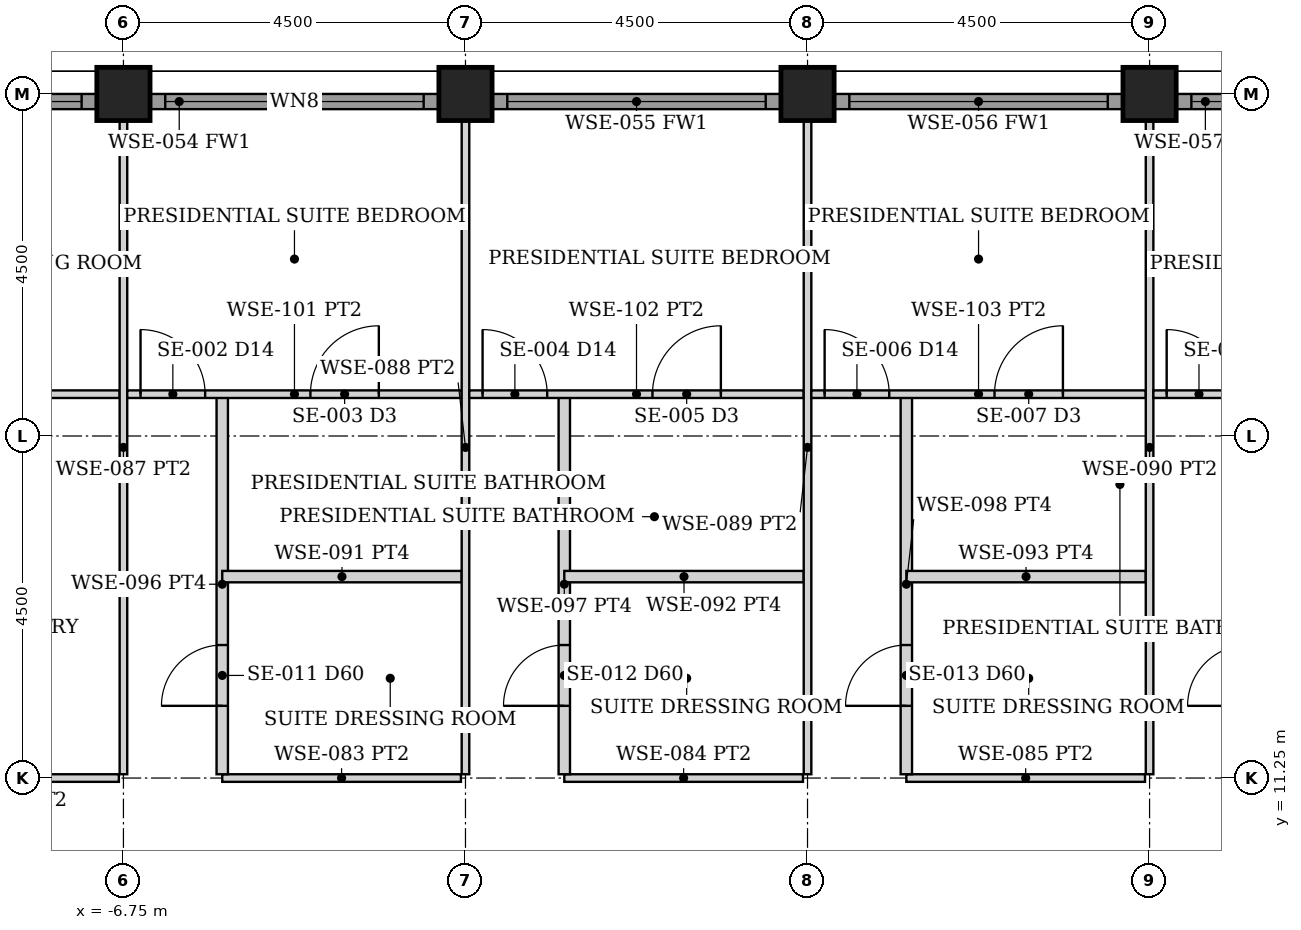
"""IFC4 building model, lengths in metres.
Left out: names, types, materials, properties, quantities, classifications, styles, units other than length and angle.
Written with IfcOpenShell. Run it as: python <this file> out.ifc"""

import sys

from ifc_helpers import new_model, si_unit, direction, frame, frame_2d, origin, origin_2d, place, context, subcontext, project, spatial, rectangle, hollow_rectangle, extrude, element, fill, save


model = new_model("IFC4")
c1 = context("Model", 3, precision=1e-05, world=origin(), true_north=direction((0.0, 1.0)))
c2 = subcontext(c1, "Body", "Model", "MODEL_VIEW")
j1 = project(units=[si_unit("LENGTHUNIT", "METRE"), si_unit("PLANEANGLEUNIT", "RADIAN")], contexts=[c1])
p1 = place(None, origin())
s1 = spatial("IfcSite", under=j1, at=p1, CompositionType="ELEMENT")
p2 = place(p1, origin())
s2 = spatial("IfcBuilding", under=s1, at=p2, CompositionType="ELEMENT")
p3 = place(p2, frame((0.0, 0.0, 253.3)))
s3 = spatial("IfcBuildingStorey", under=s2, at=p3, CompositionType="ELEMENT", Elevation=253.3)
for number, where, z_axis, x_axis in (
    (1, (-6.75, 20.25, 0.0), (0.0, 0.0, 1.0), (0.0, 1.0, 0.0)),
    (2, (-2.25, 20.25, 0.0), (0.0, 0.0, 1.0), (0.0, 1.0, 0.0)),
    (3, (2.25, 20.25, 0.0), (0.0, 0.0, 1.0), (0.0, 1.0, 0.0)),
    (4, (6.75, 20.25, 0.0), (0.0, 0.0, 1.0), (0.0, 1.0, 0.0)),
):
    element("IfcColumn", number, at=place(p3, frame(where, z_axis=z_axis, x_axis=x_axis)), inside=s3, PredefinedType="COLUMN", context=c2, shape_type="SweptSolid", body=[
        extrude(hollow_rectangle(XDim=0.7, YDim=0.7, WallThickness=0.035, at=origin_2d()), origin(), (0.0, 0.0, 1.0), 3.75),
    ])
p4 = place(p3, frame((-10.895, 20.15, 0.0), z_axis=(0.0, 0.0, 1.0), x_axis=(1.0, 0.0, 0.0)))
e5 = element("IfcWall", 5, at=p4, inside=s3, PredefinedType="SOLIDWALL", context=c2, shape_type="SweptSolid", body=[
    extrude(rectangle(XDim=3.79, YDim=0.2, at=frame_2d((1.895, 0.0))), origin(), (0.0, 0.0, 1.0), 2.579),
])
p5 = place(p4, frame((0.195, 0.0, 0.3)))
e6 = element("IfcOpeningElement", 6, at=p5, cuts=e5, PredefinedType="OPENING", context=c2, shape_type="SweptSolid", body=[
    extrude(rectangle(XDim=3.4, YDim=2.129, at=frame_2d((1.7, 1.064))), frame((0.0, 0.11, 0.0), z_axis=(0.0, -1.0, 0.0), x_axis=(1.0, 0.0, 0.0)), (0.0, 0.0, 1.0), 0.22),
])
p6 = place(p3, frame((-6.395, 20.15, 0.0), z_axis=(0.0, 0.0, 1.0), x_axis=(1.0, 0.0, 0.0)))
e7 = element("IfcWall", 7, at=p6, inside=s3, PredefinedType="SOLIDWALL", context=c2, shape_type="SweptSolid", body=[
    extrude(rectangle(XDim=3.79, YDim=0.2, at=frame_2d((1.895, 0.0))), origin(), (0.0, 0.0, 1.0), 2.579),
])
p7 = place(p6, frame((0.195, 0.0, 0.3)))
e8 = element("IfcOpeningElement", 8, at=p7, cuts=e7, PredefinedType="OPENING", context=c2, shape_type="SweptSolid", body=[
    extrude(rectangle(XDim=3.4, YDim=2.129, at=frame_2d((1.7, 1.064))), frame((0.0, 0.11, 0.0), z_axis=(0.0, -1.0, 0.0), x_axis=(1.0, 0.0, 0.0)), (0.0, 0.0, 1.0), 0.22),
])
p8 = place(p3, frame((-1.895, 20.15, 0.0), z_axis=(0.0, 0.0, 1.0), x_axis=(1.0, 0.0, 0.0)))
e9 = element("IfcWall", 9, at=p8, inside=s3, PredefinedType="SOLIDWALL", context=c2, shape_type="SweptSolid", body=[
    extrude(rectangle(XDim=3.79, YDim=0.2, at=frame_2d((1.895, 0.0))), origin(), (0.0, 0.0, 1.0), 2.579),
])
p9 = place(p8, frame((0.195, 0.0, 0.3)))
e10 = element("IfcOpeningElement", 10, at=p9, cuts=e9, PredefinedType="OPENING", context=c2, shape_type="SweptSolid", body=[
    extrude(rectangle(XDim=3.4, YDim=2.129, at=frame_2d((1.7, 1.064))), frame((0.0, 0.11, 0.0), z_axis=(0.0, -1.0, 0.0), x_axis=(1.0, 0.0, 0.0)), (0.0, 0.0, 1.0), 0.22),
])
p10 = place(p3, frame((2.605, 20.15, 0.0), z_axis=(0.0, 0.0, 1.0), x_axis=(1.0, 0.0, 0.0)))
e11 = element("IfcWall", 11, at=p10, inside=s3, PredefinedType="SOLIDWALL", context=c2, shape_type="SweptSolid", body=[
    extrude(rectangle(XDim=3.79, YDim=0.2, at=frame_2d((1.895, 0.0))), origin(), (0.0, 0.0, 1.0), 2.579),
])
p11 = place(p10, frame((0.195, 0.0, 0.3)))
e12 = element("IfcOpeningElement", 12, at=p11, cuts=e11, PredefinedType="OPENING", context=c2, shape_type="SweptSolid", body=[
    extrude(rectangle(XDim=3.4, YDim=2.129, at=frame_2d((1.7, 1.064))), frame((0.0, 0.11, 0.0), z_axis=(0.0, -1.0, 0.0), x_axis=(1.0, 0.0, 0.0)), (0.0, 0.0, 1.0), 0.22),
])
p12 = place(p3, frame((7.105, 20.15, 0.0), z_axis=(0.0, 0.0, 1.0), x_axis=(1.0, 0.0, 0.0)))
e13 = element("IfcWall", 13, at=p12, inside=s3, PredefinedType="SOLIDWALL", context=c2, shape_type="SweptSolid", body=[
    extrude(rectangle(XDim=3.79, YDim=0.2, at=frame_2d((1.895, 0.0))), origin(), (0.0, 0.0, 1.0), 2.579),
])
p13 = place(p12, frame((0.195, 0.0, 0.3)))
e14 = element("IfcOpeningElement", 14, at=p13, cuts=e13, PredefinedType="OPENING", context=c2, shape_type="SweptSolid", body=[
    extrude(rectangle(XDim=3.4, YDim=2.129, at=frame_2d((1.7, 1.064))), frame((0.0, 0.11, 0.0), z_axis=(0.0, -1.0, 0.0), x_axis=(1.0, 0.0, 0.0)), (0.0, 0.0, 1.0), 0.22),
])
p14 = place(p3, frame((-9.95, 11.25, 0.0), z_axis=(0.0, 0.0, 1.0), x_axis=(1.0, 0.0, 0.0)))
e15 = element("IfcWall", 15, at=p14, inside=s3, PredefinedType="PARTITIONING", context=c2, shape_type="SweptSolid", body=[
    extrude(rectangle(XDim=3.14, YDim=0.1, at=frame_2d((1.57, 0.0))), origin(), (0.0, 0.0, 1.0), 2.573),
])
p15 = place(p3, frame((-11.19, 16.3, 0.0), z_axis=(0.0, 0.0, 1.0), x_axis=(1.0, 0.0, 0.0)))
e16 = element("IfcWall", 16, at=p15, inside=s3, PredefinedType="PARTITIONING", context=c2, shape_type="SweptSolid", body=[
    extrude(rectangle(XDim=4.39, YDim=0.1, at=frame_2d((2.195, 0.0))), origin(), (0.0, 0.0, 1.0), 2.573),
])
p16 = place(p15, frame((0.14, 0.0, 0.0)))
e17 = element("IfcOpeningElement", 17, at=p16, cuts=e16, PredefinedType="OPENING", context=c2, shape_type="SweptSolid", body=[
    extrude(rectangle(XDim=0.9, YDim=2.1, at=frame_2d((0.45, 1.05))), frame((0.0, 0.06, 0.0), z_axis=(0.0, -1.0, 0.0), x_axis=(1.0, 0.0, 0.0)), (0.0, 0.0, 1.0), 0.12),
])
p17 = place(p3, frame((-6.75, 11.3, 0.0), z_axis=(0.0, 0.0, 1.0), x_axis=(0.0, 1.0, 0.0)))
e18 = element("IfcWall", 18, at=p17, inside=s3, PredefinedType="PARTITIONING", context=c2, shape_type="SweptSolid", body=[
    extrude(rectangle(XDim=8.6, YDim=0.1, at=frame_2d((4.3, 0.0))), origin(), (0.0, 0.0, 1.0), 2.573),
])
p18 = place(p3, frame((-5.45, 11.25, 0.0), z_axis=(0.0, 0.0, 1.0), x_axis=(1.0, 0.0, 0.0)))
e19 = element("IfcWall", 19, at=p18, inside=s3, PredefinedType="PARTITIONING", context=c2, shape_type="SweptSolid", body=[
    extrude(rectangle(XDim=3.14, YDim=0.1, at=frame_2d((1.57, 0.0))), origin(), (0.0, 0.0, 1.0), 2.573),
])
p19 = place(p3, frame((-5.45, 11.3, 0.0), z_axis=(0.0, 0.0, 1.0), x_axis=(0.0, 1.0, 0.0)))
e20 = element("IfcWall", 20, at=p19, inside=s3, PredefinedType="PARTITIONING", context=c2, shape_type="SweptSolid", body=[
    extrude(rectangle(XDim=5.0, YDim=0.15, at=frame_2d((2.5, 0.0))), origin(), (0.0, 0.0, 1.0), 2.573),
])
p20 = place(p19, frame((0.9, 0.0, 0.0)))
e21 = element("IfcOpeningElement", 21, at=p20, cuts=e20, PredefinedType="OPENING", context=c2, shape_type="SweptSolid", body=[
    extrude(rectangle(XDim=0.8, YDim=2.1, at=frame_2d((0.4, 1.05))), frame((0.0, 0.085, 0.0), z_axis=(0.0, -1.0, 0.0), x_axis=(1.0, 0.0, 0.0)), (0.0, 0.0, 1.0), 0.17),
])
p21 = place(p3, frame((-6.7, 16.3, 0.0), z_axis=(0.0, 0.0, 1.0), x_axis=(1.0, 0.0, 0.0)))
e22 = element("IfcWall", 22, at=p21, inside=s3, PredefinedType="PARTITIONING", context=c2, shape_type="SweptSolid", body=[
    extrude(rectangle(XDim=4.4, YDim=0.1, at=frame_2d((2.2, 0.0))), origin(), (0.0, 0.0, 1.0), 2.573),
])
p22 = place(p21, frame((0.175, 0.0, 0.0)))
e23 = element("IfcOpeningElement", 23, at=p22, cuts=e22, PredefinedType="OPENING", context=c2, shape_type="SweptSolid", body=[
    extrude(rectangle(XDim=0.85, YDim=2.1, at=frame_2d((0.425, 1.05))), frame((0.0, 0.06, 0.0), z_axis=(0.0, -1.0, 0.0), x_axis=(1.0, 0.0, 0.0)), (0.0, 0.0, 1.0), 0.12),
])
p23 = place(p21, frame((2.41, 0.0, 0.0)))
e24 = element("IfcOpeningElement", 24, at=p23, cuts=e22, PredefinedType="OPENING", context=c2, shape_type="SweptSolid", body=[
    extrude(rectangle(XDim=0.9, YDim=2.1, at=frame_2d((0.45, 1.05))), frame((0.0, 0.06, 0.0), z_axis=(0.0, -1.0, 0.0), x_axis=(1.0, 0.0, 0.0)), (0.0, 0.0, 1.0), 0.12),
])
p24 = place(p3, frame((-5.45, 13.9, 0.0), z_axis=(0.0, 0.0, 1.0), x_axis=(1.0, 0.0, 0.0)))
e25 = element("IfcWall", 25, at=p24, inside=s3, PredefinedType="PARTITIONING", context=c2, shape_type="SweptSolid", body=[
    extrude(rectangle(XDim=3.15, YDim=0.15, at=frame_2d((1.575, 0.0))), origin(), (0.0, 0.0, 1.0), 2.573),
])
p25 = place(p3, frame((-2.25, 11.3, 0.0), z_axis=(0.0, 0.0, 1.0), x_axis=(0.0, 1.0, 0.0)))
e26 = element("IfcWall", 26, at=p25, inside=s3, PredefinedType="PARTITIONING", context=c2, shape_type="SweptSolid", body=[
    extrude(rectangle(XDim=8.6, YDim=0.1, at=frame_2d((4.3, 0.0))), origin(), (0.0, 0.0, 1.0), 2.573),
])
p26 = place(p3, frame((-0.95, 11.25, 0.0), z_axis=(0.0, 0.0, 1.0), x_axis=(1.0, 0.0, 0.0)))
e27 = element("IfcWall", 27, at=p26, inside=s3, PredefinedType="PARTITIONING", context=c2, shape_type="SweptSolid", body=[
    extrude(rectangle(XDim=3.14, YDim=0.1, at=frame_2d((1.57, 0.0))), origin(), (0.0, 0.0, 1.0), 2.573),
])
p27 = place(p3, frame((-0.95, 11.3, 0.0), z_axis=(0.0, 0.0, 1.0), x_axis=(0.0, 1.0, 0.0)))
e28 = element("IfcWall", 28, at=p27, inside=s3, PredefinedType="PARTITIONING", context=c2, shape_type="SweptSolid", body=[
    extrude(rectangle(XDim=5.0, YDim=0.15, at=frame_2d((2.5, 0.0))), origin(), (0.0, 0.0, 1.0), 2.573),
])
p28 = place(p27, frame((0.9, 0.0, 0.0)))
e29 = element("IfcOpeningElement", 29, at=p28, cuts=e28, PredefinedType="OPENING", context=c2, shape_type="SweptSolid", body=[
    extrude(rectangle(XDim=0.8, YDim=2.1, at=frame_2d((0.4, 1.05))), frame((0.0, 0.085, 0.0), z_axis=(0.0, -1.0, 0.0), x_axis=(1.0, 0.0, 0.0)), (0.0, 0.0, 1.0), 0.17),
])
p29 = place(p3, frame((-2.2, 16.3, 0.0), z_axis=(0.0, 0.0, 1.0), x_axis=(1.0, 0.0, 0.0)))
e30 = element("IfcWall", 30, at=p29, inside=s3, PredefinedType="PARTITIONING", context=c2, shape_type="SweptSolid", body=[
    extrude(rectangle(XDim=4.4, YDim=0.1, at=frame_2d((2.2, 0.0))), origin(), (0.0, 0.0, 1.0), 2.573),
])
p30 = place(p29, frame((0.175, 0.0, 0.0)))
e31 = element("IfcOpeningElement", 31, at=p30, cuts=e30, PredefinedType="OPENING", context=c2, shape_type="SweptSolid", body=[
    extrude(rectangle(XDim=0.85, YDim=2.1, at=frame_2d((0.425, 1.05))), frame((0.0, 0.06, 0.0), z_axis=(0.0, -1.0, 0.0), x_axis=(1.0, 0.0, 0.0)), (0.0, 0.0, 1.0), 0.12),
])
p31 = place(p29, frame((2.41, 0.0, 0.0)))
e32 = element("IfcOpeningElement", 32, at=p31, cuts=e30, PredefinedType="OPENING", context=c2, shape_type="SweptSolid", body=[
    extrude(rectangle(XDim=0.9, YDim=2.1, at=frame_2d((0.45, 1.05))), frame((0.0, 0.06, 0.0), z_axis=(0.0, -1.0, 0.0), x_axis=(1.0, 0.0, 0.0)), (0.0, 0.0, 1.0), 0.12),
])
p32 = place(p3, frame((-0.95, 13.9, 0.0), z_axis=(0.0, 0.0, 1.0), x_axis=(1.0, 0.0, 0.0)))
e33 = element("IfcWall", 33, at=p32, inside=s3, PredefinedType="PARTITIONING", context=c2, shape_type="SweptSolid", body=[
    extrude(rectangle(XDim=3.15, YDim=0.15, at=frame_2d((1.575, 0.0))), origin(), (0.0, 0.0, 1.0), 2.573),
])
p33 = place(p3, frame((2.25, 11.3, 0.0), z_axis=(0.0, 0.0, 1.0), x_axis=(0.0, 1.0, 0.0)))
e34 = element("IfcWall", 34, at=p33, inside=s3, PredefinedType="PARTITIONING", context=c2, shape_type="SweptSolid", body=[
    extrude(rectangle(XDim=8.6, YDim=0.1, at=frame_2d((4.3, 0.0))), origin(), (0.0, 0.0, 1.0), 2.573),
])
p34 = place(p3, frame((3.55, 11.25, 0.0), z_axis=(0.0, 0.0, 1.0), x_axis=(1.0, 0.0, 0.0)))
e35 = element("IfcWall", 35, at=p34, inside=s3, PredefinedType="PARTITIONING", context=c2, shape_type="SweptSolid", body=[
    extrude(rectangle(XDim=3.14, YDim=0.1, at=frame_2d((1.57, 0.0))), origin(), (0.0, 0.0, 1.0), 2.573),
])
p35 = place(p3, frame((3.55, 11.3, 0.0), z_axis=(0.0, 0.0, 1.0), x_axis=(0.0, 1.0, 0.0)))
e36 = element("IfcWall", 36, at=p35, inside=s3, PredefinedType="PARTITIONING", context=c2, shape_type="SweptSolid", body=[
    extrude(rectangle(XDim=5.0, YDim=0.15, at=frame_2d((2.5, 0.0))), origin(), (0.0, 0.0, 1.0), 2.573),
])
p36 = place(p35, frame((0.9, 0.0, 0.0)))
e37 = element("IfcOpeningElement", 37, at=p36, cuts=e36, PredefinedType="OPENING", context=c2, shape_type="SweptSolid", body=[
    extrude(rectangle(XDim=0.8, YDim=2.1, at=frame_2d((0.4, 1.05))), frame((0.0, 0.085, 0.0), z_axis=(0.0, -1.0, 0.0), x_axis=(1.0, 0.0, 0.0)), (0.0, 0.0, 1.0), 0.17),
])
p37 = place(p3, frame((2.3, 16.3, 0.0), z_axis=(0.0, 0.0, 1.0), x_axis=(1.0, 0.0, 0.0)))
e38 = element("IfcWall", 38, at=p37, inside=s3, PredefinedType="PARTITIONING", context=c2, shape_type="SweptSolid", body=[
    extrude(rectangle(XDim=4.4, YDim=0.1, at=frame_2d((2.2, 0.0))), origin(), (0.0, 0.0, 1.0), 2.573),
])
p38 = place(p37, frame((0.175, 0.0, 0.0)))
e39 = element("IfcOpeningElement", 39, at=p38, cuts=e38, PredefinedType="OPENING", context=c2, shape_type="SweptSolid", body=[
    extrude(rectangle(XDim=0.85, YDim=2.1, at=frame_2d((0.425, 1.05))), frame((0.0, 0.06, 0.0), z_axis=(0.0, -1.0, 0.0), x_axis=(1.0, 0.0, 0.0)), (0.0, 0.0, 1.0), 0.12),
])
p39 = place(p37, frame((2.41, 0.0, 0.0)))
e40 = element("IfcOpeningElement", 40, at=p39, cuts=e38, PredefinedType="OPENING", context=c2, shape_type="SweptSolid", body=[
    extrude(rectangle(XDim=0.9, YDim=2.1, at=frame_2d((0.45, 1.05))), frame((0.0, 0.06, 0.0), z_axis=(0.0, -1.0, 0.0), x_axis=(1.0, 0.0, 0.0)), (0.0, 0.0, 1.0), 0.12),
])
p40 = place(p3, frame((3.55, 13.9, 0.0), z_axis=(0.0, 0.0, 1.0), x_axis=(1.0, 0.0, 0.0)))
e41 = element("IfcWall", 41, at=p40, inside=s3, PredefinedType="PARTITIONING", context=c2, shape_type="SweptSolid", body=[
    extrude(rectangle(XDim=3.15, YDim=0.15, at=frame_2d((1.575, 0.0))), origin(), (0.0, 0.0, 1.0), 2.573),
])
p41 = place(p3, frame((6.75, 11.3, 0.0), z_axis=(0.0, 0.0, 1.0), x_axis=(0.0, 1.0, 0.0)))
e42 = element("IfcWall", 42, at=p41, inside=s3, PredefinedType="PARTITIONING", context=c2, shape_type="SweptSolid", body=[
    extrude(rectangle(XDim=8.6, YDim=0.1, at=frame_2d((4.3, 0.0))), origin(), (0.0, 0.0, 1.0), 2.573),
])
p42 = place(p3, frame((6.8, 16.3, 0.0), z_axis=(0.0, 0.0, 1.0), x_axis=(1.0, 0.0, 0.0)))
e43 = element("IfcWall", 43, at=p42, inside=s3, PredefinedType="PARTITIONING", context=c2, shape_type="SweptSolid", body=[
    extrude(rectangle(XDim=4.39, YDim=0.1, at=frame_2d((2.195, 0.0))), origin(), (0.0, 0.0, 1.0), 2.573),
])
p43 = place(p42, frame((0.175, 0.0, 0.0)))
e44 = element("IfcOpeningElement", 44, at=p43, cuts=e43, PredefinedType="OPENING", context=c2, shape_type="SweptSolid", body=[
    extrude(rectangle(XDim=0.85, YDim=2.1, at=frame_2d((0.425, 1.05))), frame((0.0, 0.06, 0.0), z_axis=(0.0, -1.0, 0.0), x_axis=(1.0, 0.0, 0.0)), (0.0, 0.0, 1.0), 0.12),
])
p44 = place(p42, frame((2.41, 0.0, 0.0)))
e45 = element("IfcOpeningElement", 45, at=p44, cuts=e43, PredefinedType="OPENING", context=c2, shape_type="SweptSolid", body=[
    extrude(rectangle(XDim=0.9, YDim=2.1, at=frame_2d((0.45, 1.05))), frame((0.0, 0.06, 0.0), z_axis=(0.0, -1.0, 0.0), x_axis=(1.0, 0.0, 0.0)), (0.0, 0.0, 1.0), 0.12),
])
p45 = place(p5, origin())
e46 = element("IfcWindow", 46, at=p45, inside=s3, PartitioningType="SINGLE_PANEL", PredefinedType="WINDOW", context=c2, shape_type="SweptSolid", body=[
    extrude(rectangle(XDim=3.4, YDim=2.129, at=frame_2d((1.7, 1.064))), frame((0.0, 0.03, 0.0), z_axis=(0.0, -1.0, 0.0), x_axis=(1.0, 0.0, 0.0)), (0.0, 0.0, 1.0), 0.06),
])
fill(e6, e46)
p46 = place(p7, origin())
e47 = element("IfcWindow", 47, at=p46, inside=s3, PartitioningType="SINGLE_PANEL", PredefinedType="WINDOW", context=c2, shape_type="SweptSolid", body=[
    extrude(rectangle(XDim=3.4, YDim=2.129, at=frame_2d((1.7, 1.064))), frame((0.0, 0.03, 0.0), z_axis=(0.0, -1.0, 0.0), x_axis=(1.0, 0.0, 0.0)), (0.0, 0.0, 1.0), 0.06),
])
fill(e8, e47)
p47 = place(p9, origin())
e48 = element("IfcWindow", 48, at=p47, inside=s3, PartitioningType="SINGLE_PANEL", PredefinedType="WINDOW", context=c2, shape_type="SweptSolid", body=[
    extrude(rectangle(XDim=3.4, YDim=2.129, at=frame_2d((1.7, 1.064))), frame((0.0, 0.03, 0.0), z_axis=(0.0, -1.0, 0.0), x_axis=(1.0, 0.0, 0.0)), (0.0, 0.0, 1.0), 0.06),
])
fill(e10, e48)
p48 = place(p11, origin())
e49 = element("IfcWindow", 49, at=p48, inside=s3, PartitioningType="SINGLE_PANEL", PredefinedType="WINDOW", context=c2, shape_type="SweptSolid", body=[
    extrude(rectangle(XDim=3.4, YDim=2.129, at=frame_2d((1.7, 1.064))), frame((0.0, 0.03, 0.0), z_axis=(0.0, -1.0, 0.0), x_axis=(1.0, 0.0, 0.0)), (0.0, 0.0, 1.0), 0.06),
])
fill(e12, e49)
p49 = place(p13, origin())
e50 = element("IfcWindow", 50, at=p49, inside=s3, PartitioningType="SINGLE_PANEL", PredefinedType="WINDOW", context=c2, shape_type="SweptSolid", body=[
    extrude(rectangle(XDim=3.4, YDim=2.129, at=frame_2d((1.7, 1.064))), frame((0.0, 0.03, 0.0), z_axis=(0.0, -1.0, 0.0), x_axis=(1.0, 0.0, 0.0)), (0.0, 0.0, 1.0), 0.06),
])
fill(e14, e50)
p50 = place(p22, origin())
e51 = element("IfcDoor", 51, at=p50, inside=s3, OperationType="SINGLE_SWING_LEFT", PredefinedType="DOOR", context=c2, shape_type="SweptSolid", body=[
    extrude(rectangle(XDim=0.85, YDim=2.1, at=frame_2d((0.425, 1.05))), frame((0.0, 0.025, 0.0), z_axis=(0.0, -1.0, 0.0), x_axis=(1.0, 0.0, 0.0)), (0.0, 0.0, 1.0), 0.05),
])
fill(e23, e51)
p51 = place(p20, origin())
e52 = element("IfcDoor", 52, at=p51, inside=s3, OperationType="SINGLE_SWING_LEFT", PredefinedType="DOOR", context=c2, shape_type="SweptSolid", body=[
    extrude(rectangle(XDim=0.8, YDim=2.1, at=frame_2d((0.4, 1.05))), frame((0.0, 0.025, 0.0), z_axis=(0.0, -1.0, 0.0), x_axis=(1.0, 0.0, 0.0)), (0.0, 0.0, 1.0), 0.05),
])
fill(e21, e52)
p52 = place(p23, origin())
e53 = element("IfcDoor", 53, at=p52, inside=s3, OperationType="SINGLE_SWING_RIGHT", PredefinedType="DOOR", context=c2, shape_type="SweptSolid", body=[
    extrude(rectangle(XDim=0.9, YDim=2.1, at=frame_2d((0.45, 1.05))), frame((0.0, 0.025, 0.0), z_axis=(0.0, -1.0, 0.0), x_axis=(1.0, 0.0, 0.0)), (0.0, 0.0, 1.0), 0.05),
])
fill(e24, e53)
p53 = place(p30, origin())
e54 = element("IfcDoor", 54, at=p53, inside=s3, OperationType="SINGLE_SWING_LEFT", PredefinedType="DOOR", context=c2, shape_type="SweptSolid", body=[
    extrude(rectangle(XDim=0.85, YDim=2.1, at=frame_2d((0.425, 1.05))), frame((0.0, 0.025, 0.0), z_axis=(0.0, -1.0, 0.0), x_axis=(1.0, 0.0, 0.0)), (0.0, 0.0, 1.0), 0.05),
])
fill(e31, e54)
p54 = place(p28, origin())
e55 = element("IfcDoor", 55, at=p54, inside=s3, OperationType="SINGLE_SWING_LEFT", PredefinedType="DOOR", context=c2, shape_type="SweptSolid", body=[
    extrude(rectangle(XDim=0.8, YDim=2.1, at=frame_2d((0.4, 1.05))), frame((0.0, 0.025, 0.0), z_axis=(0.0, -1.0, 0.0), x_axis=(1.0, 0.0, 0.0)), (0.0, 0.0, 1.0), 0.05),
])
fill(e29, e55)
p55 = place(p31, origin())
e56 = element("IfcDoor", 56, at=p55, inside=s3, OperationType="SINGLE_SWING_RIGHT", PredefinedType="DOOR", context=c2, shape_type="SweptSolid", body=[
    extrude(rectangle(XDim=0.9, YDim=2.1, at=frame_2d((0.45, 1.05))), frame((0.0, 0.025, 0.0), z_axis=(0.0, -1.0, 0.0), x_axis=(1.0, 0.0, 0.0)), (0.0, 0.0, 1.0), 0.05),
])
fill(e32, e56)
p56 = place(p38, origin())
e57 = element("IfcDoor", 57, at=p56, inside=s3, OperationType="SINGLE_SWING_LEFT", PredefinedType="DOOR", context=c2, shape_type="SweptSolid", body=[
    extrude(rectangle(XDim=0.85, YDim=2.1, at=frame_2d((0.425, 1.05))), frame((0.0, 0.025, 0.0), z_axis=(0.0, -1.0, 0.0), x_axis=(1.0, 0.0, 0.0)), (0.0, 0.0, 1.0), 0.05),
])
fill(e39, e57)
p57 = place(p36, origin())
e58 = element("IfcDoor", 58, at=p57, inside=s3, OperationType="SINGLE_SWING_LEFT", PredefinedType="DOOR", context=c2, shape_type="SweptSolid", body=[
    extrude(rectangle(XDim=0.8, YDim=2.1, at=frame_2d((0.4, 1.05))), frame((0.0, 0.025, 0.0), z_axis=(0.0, -1.0, 0.0), x_axis=(1.0, 0.0, 0.0)), (0.0, 0.0, 1.0), 0.05),
])
fill(e37, e58)
p58 = place(p39, origin())
e59 = element("IfcDoor", 59, at=p58, inside=s3, OperationType="SINGLE_SWING_RIGHT", PredefinedType="DOOR", context=c2, shape_type="SweptSolid", body=[
    extrude(rectangle(XDim=0.9, YDim=2.1, at=frame_2d((0.45, 1.05))), frame((0.0, 0.025, 0.0), z_axis=(0.0, -1.0, 0.0), x_axis=(1.0, 0.0, 0.0)), (0.0, 0.0, 1.0), 0.05),
])
fill(e40, e59)
p59 = place(p43, origin())
e60 = element("IfcDoor", 60, at=p59, inside=s3, OperationType="SINGLE_SWING_LEFT", PredefinedType="DOOR", context=c2, shape_type="SweptSolid", body=[
    extrude(rectangle(XDim=0.85, YDim=2.1, at=frame_2d((0.425, 1.05))), frame((0.0, 0.025, 0.0), z_axis=(0.0, -1.0, 0.0), x_axis=(1.0, 0.0, 0.0)), (0.0, 0.0, 1.0), 0.05),
])
fill(e44, e60)
save(model, sys.argv[1])
